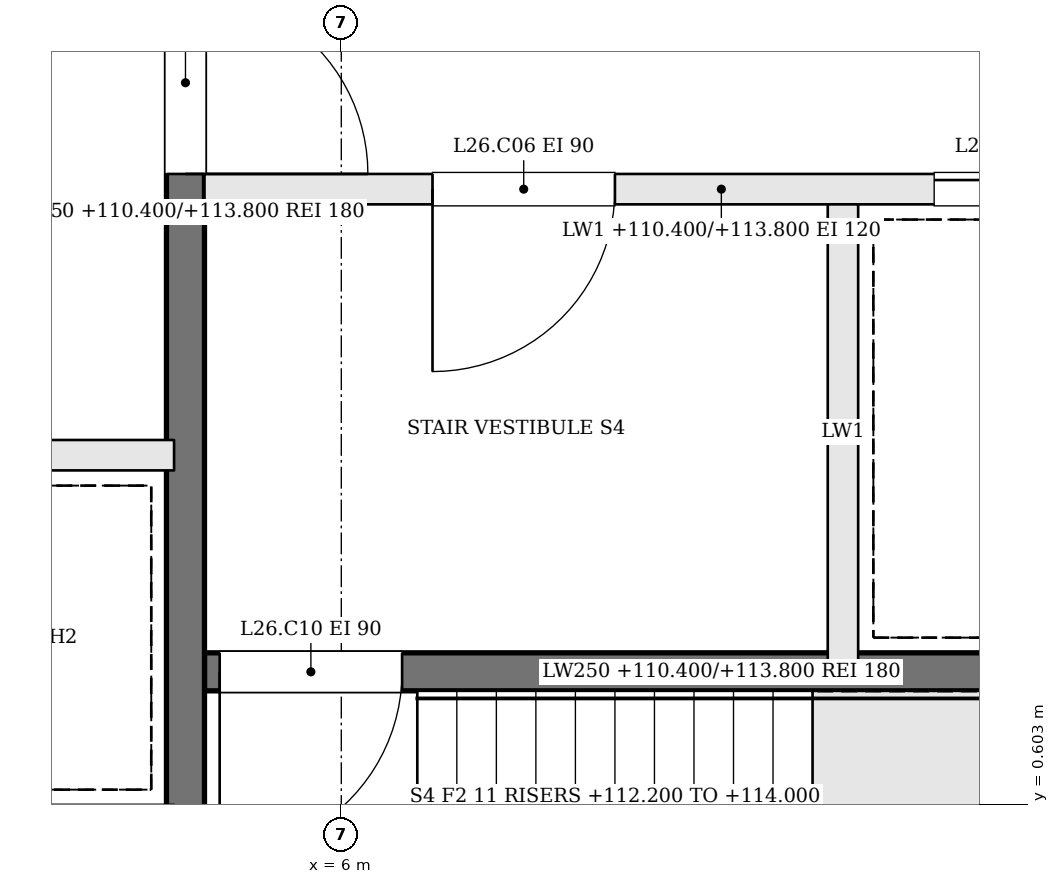
"""IFC4 building model, lengths in metres.
Left out: names, types, materials, properties, quantities, classifications, styles, units other than length and angle.
Written with IfcOpenShell. Run it as: python <this file> out.ifc"""

import sys

from ifc_helpers import new_model, si_unit, direction, frame, frame_2d, origin, place, context, subcontext, project, spatial, rectangle, extrude, element, fill, save


model = new_model("IFC4")
c1 = context("Model", 3, precision=1e-05, world=origin(), true_north=direction((0.0, 1.0)))
c2 = subcontext(c1, "Body", "Model", "MODEL_VIEW")
j1 = project(units=[si_unit("LENGTHUNIT", "METRE"), si_unit("PLANEANGLEUNIT", "RADIAN")], contexts=[c1])
p1 = place(None, origin())
s1 = spatial("IfcSite", under=j1, at=p1, CompositionType="ELEMENT")
p2 = place(p1, origin())
s2 = spatial("IfcBuilding", under=s1, at=p2, CompositionType="ELEMENT")
p3 = place(p2, frame((0.0, 0.0, 110.4)))
s3 = spatial("IfcBuildingStorey", under=s2, at=p3, CompositionType="ELEMENT", Elevation=110.4)
p4 = place(p3, frame((11.9, 4.65, 0.0), z_axis=(0.0, 0.0, 1.0), x_axis=(-1.0, 0.0, 0.0)))
e1 = element("IfcWall", 1, at=p4, inside=s3, PredefinedType="SOLIDWALL", context=c2, shape_type="SweptSolid", body=[
    extrude(rectangle(XDim=6.8, YDim=0.2, at=frame_2d((3.4, 0.0))), origin(), (0.0, 0.0, 1.0), 3.4),
])
p5 = place(p4, frame((4.1, 0.0, 0.0)))
e2 = element("IfcOpeningElement", 2, at=p5, cuts=e1, PredefinedType="OPENING", context=c2, shape_type="SweptSolid", body=[
    extrude(rectangle(XDim=1.2, YDim=2.1, at=frame_2d((0.6, 1.05))), frame((0.0, 0.11, 0.0), z_axis=(0.0, -1.0, 0.0), x_axis=(1.0, 0.0, 0.0)), (0.0, 0.0, 1.0), 0.22),
])
p6 = place(p4, frame((0.8, 0.0, 0.0)))
e3 = element("IfcOpeningElement", 3, at=p6, cuts=e1, PredefinedType="OPENING", context=c2, shape_type="SweptSolid", body=[
    extrude(rectangle(XDim=1.2, YDim=2.1, at=frame_2d((0.6, 1.05))), frame((0.0, 0.11, 0.0), z_axis=(0.0, -1.0, 0.0), x_axis=(1.0, 0.0, 0.0)), (0.0, 0.0, 1.0), 0.22),
])
p7 = place(p3, frame((11.9, 1.475, 0.0), z_axis=(0.0, 0.0, 1.0), x_axis=(-1.0, 0.0, 0.0)))
e4 = element("IfcWall", 4, at=p7, inside=s3, PredefinedType="SOLIDWALL", context=c2, shape_type="SweptSolid", body=[
    extrude(rectangle(XDim=6.8, YDim=0.25, at=frame_2d((3.4, 0.0))), origin(), (0.0, 0.0, 1.0), 3.4),
])
p8 = place(p7, frame((5.5, 0.0, 0.0)))
e5 = element("IfcOpeningElement", 5, at=p8, cuts=e4, PredefinedType="OPENING", context=c2, shape_type="SweptSolid", body=[
    extrude(rectangle(XDim=1.2, YDim=2.1, at=frame_2d((0.6, 1.05))), frame((0.0, 0.135, 0.0), z_axis=(0.0, -1.0, 0.0), x_axis=(1.0, 0.0, 0.0)), (0.0, 0.0, 1.0), 0.27),
])
p9 = place(p3, frame((9.3, 4.55, 0.0), z_axis=(0.0, 0.0, 1.0), x_axis=(0.0, -1.0, 0.0)))
e6 = element("IfcWall", 6, at=p9, inside=s3, PredefinedType="SOLIDWALL", context=c2, shape_type="SweptSolid", body=[
    extrude(rectangle(XDim=3.0, YDim=0.2, at=frame_2d((1.5, 0.0))), origin(), (0.0, 0.0, 1.0), 3.4),
])
p10 = place(p3, frame((4.975, 10.9, 0.0), z_axis=(0.0, 0.0, 1.0), x_axis=(0.0, -1.0, 0.0)))
e7 = element("IfcWall", 7, at=p10, inside=s3, PredefinedType="SOLIDWALL", context=c2, shape_type="SweptSolid", body=[
    extrude(rectangle(XDim=12.8, YDim=0.25, at=frame_2d((6.4, 0.0))), origin(), (0.0, 0.0, 1.0), 3.4),
])
p11 = place(p10, frame((4.95, 0.0, 0.0)))
e8 = element("IfcOpeningElement", 8, at=p11, cuts=e7, PredefinedType="OPENING", context=c2, shape_type="SweptSolid", body=[
    extrude(rectangle(XDim=1.2, YDim=2.1, at=frame_2d((0.6, 1.05))), frame((0.0, 0.135, 0.0), z_axis=(0.0, -1.0, 0.0), x_axis=(1.0, 0.0, 0.0)), (0.0, 0.0, 1.0), 0.27),
])
p12 = place(p3, frame((-4.9, 2.9, 0.0), z_axis=(0.0, 0.0, 1.0), x_axis=(1.0, 0.0, 0.0)))
e9 = element("IfcWall", 9, at=p12, inside=s3, PredefinedType="SOLIDWALL", context=c2, shape_type="SweptSolid", body=[
    extrude(rectangle(XDim=9.8, YDim=0.2, at=frame_2d((4.9, 0.0))), origin(), (0.0, 0.0, 1.0), 3.4),
])
p13 = place(p12, frame((0.675, 0.0, 0.0)))
e10 = element("IfcOpeningElement", 10, at=p13, cuts=e9, PredefinedType="OPENING", context=c2, shape_type="SweptSolid", body=[
    extrude(rectangle(XDim=1.1, YDim=2.1, at=frame_2d((0.55, 1.05))), frame((0.0, 0.11, 0.0), z_axis=(0.0, -1.0, 0.0), x_axis=(1.0, 0.0, 0.0)), (0.0, 0.0, 1.0), 0.22),
])
p14 = place(p12, frame((3.125, 0.0, 0.0)))
e11 = element("IfcOpeningElement", 11, at=p14, cuts=e9, PredefinedType="OPENING", context=c2, shape_type="SweptSolid", body=[
    extrude(rectangle(XDim=1.1, YDim=2.1, at=frame_2d((0.55, 1.05))), frame((0.0, 0.11, 0.0), z_axis=(0.0, -1.0, 0.0), x_axis=(1.0, 0.0, 0.0)), (0.0, 0.0, 1.0), 0.22),
])
p15 = place(p11, origin())
e12 = element("IfcDoor", 12, at=p15, inside=s3, OperationType="SINGLE_SWING_RIGHT", PredefinedType="DOOR", context=c2, shape_type="SweptSolid", body=[
    extrude(rectangle(XDim=1.2, YDim=2.1, at=frame_2d((0.6, 1.05))), frame((0.0, 0.025, 0.0), z_axis=(0.0, -1.0, 0.0), x_axis=(1.0, 0.0, 0.0)), (0.0, 0.0, 1.0), 0.05),
])
fill(e8, e12)
p16 = place(p5, origin())
e13 = element("IfcDoor", 13, at=p16, inside=s3, OperationType="SINGLE_SWING_RIGHT", PredefinedType="DOOR", context=c2, shape_type="SweptSolid", body=[
    extrude(rectangle(XDim=1.2, YDim=2.1, at=frame_2d((0.6, 1.05))), frame((0.0, 0.025, 0.0), z_axis=(0.0, -1.0, 0.0), x_axis=(1.0, 0.0, 0.0)), (0.0, 0.0, 1.0), 0.05),
])
fill(e2, e13)
p17 = place(p8, origin())
e14 = element("IfcDoor", 14, at=p17, inside=s3, OperationType="SINGLE_SWING_RIGHT", PredefinedType="DOOR", context=c2, shape_type="SweptSolid", body=[
    extrude(rectangle(XDim=1.2, YDim=2.1, at=frame_2d((0.6, 1.05))), frame((0.0, 0.025, 0.0), z_axis=(0.0, -1.0, 0.0), x_axis=(1.0, 0.0, 0.0)), (0.0, 0.0, 1.0), 0.05),
])
fill(e5, e14)
p18 = place(p6, origin())
e15 = element("IfcDoor", 15, at=p18, inside=s3, OperationType="SLIDING_TO_RIGHT", PredefinedType="DOOR", context=c2, shape_type="SweptSolid", body=[
    extrude(rectangle(XDim=1.2, YDim=2.1, at=frame_2d((0.6, 1.05))), frame((0.0, 0.025, 0.0), z_axis=(0.0, -1.0, 0.0), x_axis=(1.0, 0.0, 0.0)), (0.0, 0.0, 1.0), 0.05),
])
fill(e3, e15)
save(model, sys.argv[1])
